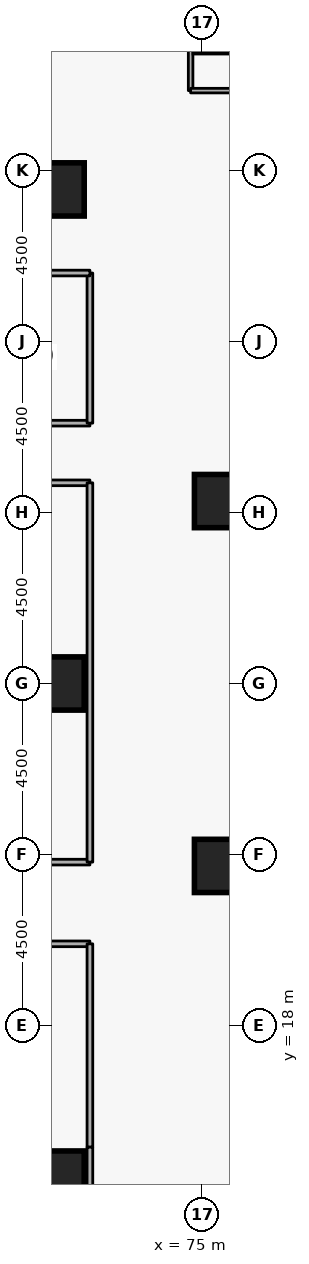
"""IFC4 building model, lengths in metres.
Left out: names, types, materials, properties, quantities, classifications, styles, units other than length and angle.
Written with IfcOpenShell. Run it as: python <this file> out.ifc"""

import sys

from ifc_helpers import new_model, si_unit, direction, frame, frame_2d, origin, origin_2d, place, context, subcontext, project, spatial, rectangle, extrude, element, save


model = new_model("IFC4")
c1 = context("Model", 3, precision=1e-05, world=origin(), true_north=direction((0.0, 1.0)))
c2 = subcontext(c1, "Body", "Model", "MODEL_VIEW")
j1 = project(units=[si_unit("LENGTHUNIT", "METRE"), si_unit("PLANEANGLEUNIT", "RADIAN")], contexts=[c1])
p1 = place(None, origin())
s1 = spatial("IfcSite", under=j1, at=p1, CompositionType="ELEMENT")
p2 = place(p1, origin())
s2 = spatial("IfcBuilding", under=s1, at=p2, CompositionType="ELEMENT")
p3 = place(p2, frame((0.0, 0.0, 14.1)))
s3 = spatial("IfcBuildingStorey", under=s2, at=p3, CompositionType="ELEMENT", Elevation=14.1)
for number, where, z_axis, x_axis in (
    (1, (71.2, 14.0, 0.0), (0.0, 0.0, 1.0), (1.0, 0.0, 0.0)),
    (2, (71.2, 27.0, 0.0), (0.0, 0.0, 1.0), (1.0, 0.0, 0.0)),
    (3, (71.2, 40.0, 0.0), (0.0, 0.0, 1.0), (1.0, 0.0, 0.0)),
    (4, (75.5, 22.2, 0.0), (0.0, 0.0, 1.0), (1.0, 0.0, 0.0)),
    (5, (75.5, 31.8, 0.0), (0.0, 0.0, 1.0), (1.0, 0.0, 0.0)),
):
    element("IfcColumn", number, at=place(p3, frame(where, z_axis=z_axis, x_axis=x_axis)), inside=s3, PredefinedType="COLUMN", context=c2, shape_type="SweptSolid", body=[
        extrude(rectangle(XDim=1.4, YDim=1.4, at=origin_2d()), origin(), (0.0, 0.0, 1.0), 4.5),
    ])
p4 = place(p3, frame((67.1, 33.85, 0.0), z_axis=(0.0, 0.0, 1.0), x_axis=(1.0, 0.0, 0.0)))
e6 = element("IfcWall", 6, at=p4, inside=s3, PredefinedType="PARTITIONING", context=c2, shape_type="SweptSolid", body=[
    extrude(rectangle(XDim=4.95, YDim=0.15, at=frame_2d((2.475, 0.0))), origin(), (0.0, 0.0, 1.0), 4.16),
])
p5 = place(p4, frame((2.015, 0.0, 0.0)))
e7 = element("IfcOpeningElement", 7, at=p5, cuts=e6, PredefinedType="OPENING", context=c2, shape_type="SweptSolid", body=[
    extrude(rectangle(XDim=0.92, YDim=2.08, at=frame_2d((0.46, 1.04))), frame((0.0, 0.085, 0.0), z_axis=(0.0, -1.0, 0.0), x_axis=(1.0, 0.0, 0.0)), (0.0, 0.0, 1.0), 0.17),
])
p6 = place(p3, frame((72.05, 33.85, 0.0), z_axis=(0.0, 0.0, 1.0), x_axis=(0.0, 1.0, 0.0)))
e8 = element("IfcWall", 8, at=p6, inside=s3, PredefinedType="PARTITIONING", context=c2, shape_type="SweptSolid", body=[
    extrude(rectangle(XDim=3.95, YDim=0.15, at=frame_2d((1.975, 0.0))), origin(), (0.0, 0.0, 1.0), 4.16),
])
p7 = place(p3, frame((72.05, 37.8, 0.0), z_axis=(0.0, 0.0, 1.0), x_axis=(-1.0, 0.0, 0.0)))
e9 = element("IfcWall", 9, at=p7, inside=s3, PredefinedType="PARTITIONING", context=c2, shape_type="SweptSolid", body=[
    extrude(rectangle(XDim=4.95, YDim=0.15, at=frame_2d((2.475, 0.0))), origin(), (0.0, 0.0, 1.0), 4.16),
])
p8 = place(p3, frame((50.6, 20.15, 0.0), z_axis=(0.0, 0.0, 1.0), x_axis=(1.0, 0.0, 0.0)))
e10 = element("IfcWall", 10, at=p8, inside=s3, PredefinedType="PARTITIONING", context=c2, shape_type="SweptSolid", body=[
    extrude(rectangle(XDim=21.45, YDim=0.15, at=frame_2d((10.725, 0.0))), origin(), (0.0, 0.0, 1.0), 4.16),
])
p9 = place(p8, frame((10.075, 0.0, 0.0)))
e11 = element("IfcOpeningElement", 11, at=p9, cuts=e10, PredefinedType="OPENING", context=c2, shape_type="SweptSolid", body=[
    extrude(rectangle(XDim=1.3, YDim=2.12, at=frame_2d((0.65, 1.06))), frame((0.0, 0.085, 0.0), z_axis=(0.0, -1.0, 0.0), x_axis=(1.0, 0.0, 0.0)), (0.0, 0.0, 1.0), 0.17),
])
p10 = place(p3, frame((72.05, 20.15, 0.0), z_axis=(0.0, 0.0, 1.0), x_axis=(0.0, -1.0, 0.0)))
e12 = element("IfcWall", 12, at=p10, inside=s3, PredefinedType="PARTITIONING", context=c2, shape_type="SweptSolid", body=[
    extrude(rectangle(XDim=5.35, YDim=0.15, at=frame_2d((2.675, 0.0))), origin(), (0.0, 0.0, 1.0), 4.16),
])
p11 = place(p3, frame((72.05, 14.8, 0.0), z_axis=(0.0, 0.0, 1.0), x_axis=(0.0, -1.0, 0.0)))
e13 = element("IfcWall", 13, at=p11, inside=s3, PredefinedType="PARTITIONING", context=c2, shape_type="SweptSolid", body=[
    extrude(rectangle(XDim=5.48, YDim=0.15, at=frame_2d((2.74, 0.0))), origin(), (0.0, 0.0, 1.0), 4.16),
])
p12 = place(p3, frame((72.05, 22.3, 0.0), z_axis=(0.0, 0.0, 1.0), x_axis=(-1.0, 0.0, 0.0)))
e14 = element("IfcWall", 14, at=p12, inside=s3, PredefinedType="PARTITIONING", context=c2, shape_type="SweptSolid", body=[
    extrude(rectangle(XDim=13.85, YDim=0.15, at=frame_2d((6.925, 0.0))), origin(), (0.0, 0.0, 1.0), 4.16),
])
p13 = place(p12, frame((6.275, 0.0, 0.0)))
e15 = element("IfcOpeningElement", 15, at=p13, cuts=e14, PredefinedType="OPENING", context=c2, shape_type="SweptSolid", body=[
    extrude(rectangle(XDim=1.3, YDim=2.12, at=frame_2d((0.65, 1.06))), frame((0.0, 0.085, 0.0), z_axis=(0.0, -1.0, 0.0), x_axis=(1.0, 0.0, 0.0)), (0.0, 0.0, 1.0), 0.17),
])
p14 = place(p3, frame((58.2, 32.28, 0.0), z_axis=(0.0, 0.0, 1.0), x_axis=(1.0, 0.0, 0.0)))
e16 = element("IfcWall", 16, at=p14, inside=s3, PredefinedType="PARTITIONING", context=c2, shape_type="SweptSolid", body=[
    extrude(rectangle(XDim=13.85, YDim=0.15, at=frame_2d((6.925, 0.0))), origin(), (0.0, 0.0, 1.0), 4.16),
])
p15 = place(p3, frame((72.05, 32.28, 0.0), z_axis=(0.0, 0.0, 1.0), x_axis=(0.0, -1.0, 0.0)))
e17 = element("IfcWall", 17, at=p15, inside=s3, PredefinedType="PARTITIONING", context=c2, shape_type="SweptSolid", body=[
    extrude(rectangle(XDim=9.98, YDim=0.15, at=frame_2d((4.99, 0.0))), origin(), (0.0, 0.0, 1.0), 4.16),
])
p16 = place(p3, frame((74.7, 42.6, 0.0), z_axis=(0.0, 0.0, 1.0), x_axis=(0.0, 1.0, 0.0)))
e18 = element("IfcWall", 18, at=p16, inside=s3, PredefinedType="PARTITIONING", context=c2, shape_type="SweptSolid", body=[
    extrude(rectangle(XDim=6.58, YDim=0.12, at=frame_2d((3.29, 0.0))), origin(), (0.0, 0.0, 1.0), 4.16),
])
p17 = place(p3, frame((93.3, 42.6, 0.0), z_axis=(0.0, 0.0, 1.0), x_axis=(-1.0, 0.0, 0.0)))
e19 = element("IfcWall", 19, at=p17, inside=s3, PredefinedType="PARTITIONING", context=c2, shape_type="SweptSolid", body=[
    extrude(rectangle(XDim=18.6, YDim=0.12, at=frame_2d((9.3, 0.0))), origin(), (0.0, 0.0, 1.0), 4.16),
])
p18 = place(p17, frame((8.775, 0.0, 0.0)))
e20 = element("IfcOpeningElement", 20, at=p18, cuts=e19, PredefinedType="OPENING", context=c2, shape_type="SweptSolid", body=[
    extrude(rectangle(XDim=1.05, YDim=2.1, at=frame_2d((0.525, 1.05))), frame((0.0, 0.07, 0.0), z_axis=(0.0, -1.0, 0.0), x_axis=(1.0, 0.0, 0.0)), (0.0, 0.0, 1.0), 0.14),
])
save(model, sys.argv[1])
